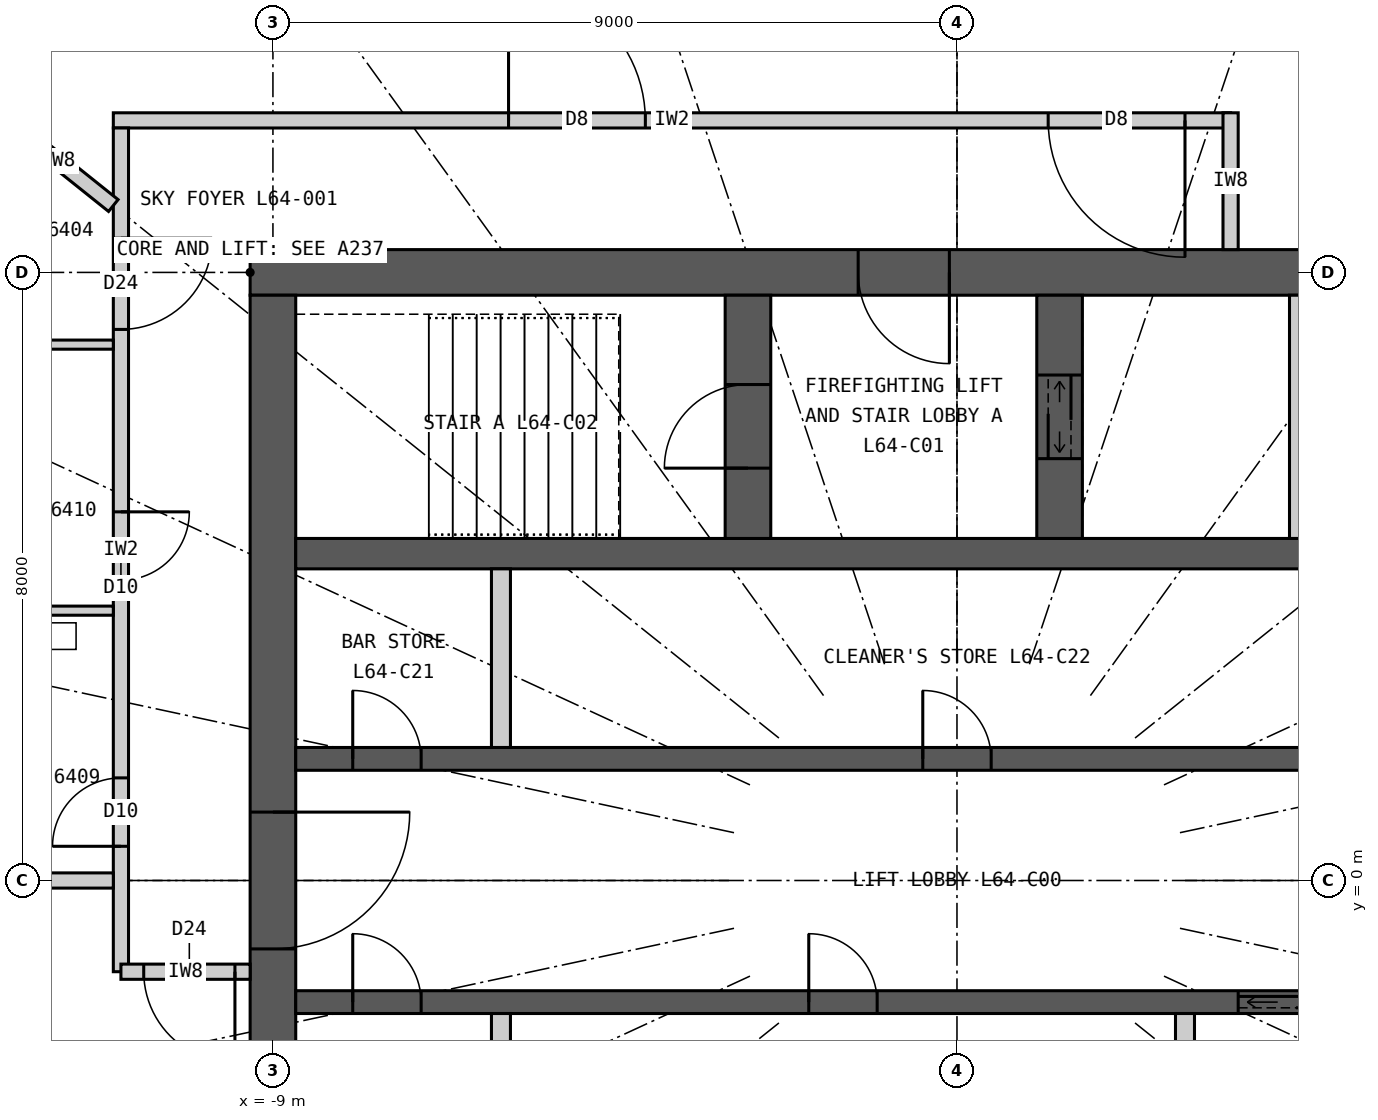
"""IFC4 building model, lengths in metres.
Left out: names, types, materials, properties, quantities, classifications, styles, units other than length and angle.
Written with IfcOpenShell. Run it as: python <this file> out.ifc"""

import sys

from ifc_helpers import new_model, si_unit, direction, frame, frame_2d, origin, place, context, subcontext, project, spatial, rectangle, extrude, element, fill, save


model = new_model("IFC4")
c1 = context("Model", 3, precision=1e-05, world=origin(), true_north=direction((0.0, 1.0)))
c2 = subcontext(c1, "Body", "Model", "MODEL_VIEW")
j1 = project(units=[si_unit("LENGTHUNIT", "METRE"), si_unit("PLANEANGLEUNIT", "RADIAN")], contexts=[c1])
p1 = place(None, origin())
s1 = spatial("IfcSite", under=j1, at=p1, CompositionType="ELEMENT")
p2 = place(p1, origin())
s2 = spatial("IfcBuilding", under=s1, at=p2, CompositionType="ELEMENT")
p3 = place(p2, frame((0.0, 0.0, 237.3)))
s3 = spatial("IfcBuildingStorey", under=s2, at=p3, CompositionType="ELEMENT", Elevation=237.3)
p4 = place(p3, frame((-9.3, 8.0, 0.0), z_axis=(0.0, 0.0, 1.0), x_axis=(1.0, 0.0, 0.0)))
e1 = element("IfcWall", 1, at=p4, inside=s3, PredefinedType="SHEAR", context=c2, shape_type="SweptSolid", body=[
    extrude(rectangle(XDim=18.6, YDim=0.6, at=frame_2d((9.3, 0.0))), origin(), (0.0, 0.0, 1.0), 5.4),
])
p5 = place(p4, frame((8.0, 0.0, 0.0)))
e2 = element("IfcOpeningElement", 2, at=p5, cuts=e1, PredefinedType="OPENING", context=c2, shape_type="SweptSolid", body=[
    extrude(rectangle(XDim=1.2, YDim=2.2, at=frame_2d((0.6, 1.1))), frame((0.0, 0.31, 0.0), z_axis=(0.0, -1.0, 0.0), x_axis=(1.0, 0.0, 0.0)), (0.0, 0.0, 1.0), 0.62),
])
p6 = place(p4, frame((15.6, 0.0, 0.0)))
e3 = element("IfcOpeningElement", 3, at=p6, cuts=e1, PredefinedType="OPENING", context=c2, shape_type="SweptSolid", body=[
    extrude(rectangle(XDim=0.9, YDim=2.2, at=frame_2d((0.45, 1.1))), frame((0.0, 0.31, 0.0), z_axis=(0.0, -1.0, 0.0), x_axis=(1.0, 0.0, 0.0)), (0.0, 0.0, 1.0), 0.62),
])
p7 = place(p3, frame((-9.0, 7.7, 0.0), z_axis=(0.0, 0.0, 1.0), x_axis=(0.0, -1.0, 0.0)))
e4 = element("IfcWall", 4, at=p7, inside=s3, PredefinedType="SHEAR", context=c2, shape_type="SweptSolid", body=[
    extrude(rectangle(XDim=15.4, YDim=0.6, at=frame_2d((7.7, 0.0))), origin(), (0.0, 0.0, 1.0), 5.4),
])
p8 = place(p7, frame((6.8, 0.0, 0.0)))
e5 = element("IfcOpeningElement", 5, at=p8, cuts=e4, PredefinedType="OPENING", context=c2, shape_type="SweptSolid", body=[
    extrude(rectangle(XDim=1.8, YDim=2.2, at=frame_2d((0.9, 1.1))), frame((0.0, 0.31, 0.0), z_axis=(0.0, -1.0, 0.0), x_axis=(1.0, 0.0, 0.0)), (0.0, 0.0, 1.0), 0.62),
])
p9 = place(p3, frame((-8.7, 4.3, 0.0), z_axis=(0.0, 0.0, 1.0), x_axis=(1.0, 0.0, 0.0)))
e6 = element("IfcWall", 6, at=p9, inside=s3, PredefinedType="SHEAR", context=c2, shape_type="SweptSolid", body=[
    extrude(rectangle(XDim=17.4, YDim=0.4, at=frame_2d((8.7, 0.0))), origin(), (0.0, 0.0, 1.0), 5.4),
])
p10 = place(p3, frame((-8.7, 1.6, 0.0), z_axis=(0.0, 0.0, 1.0), x_axis=(1.0, 0.0, 0.0)))
e7 = element("IfcWall", 7, at=p10, inside=s3, PredefinedType="SHEAR", context=c2, shape_type="SweptSolid", body=[
    extrude(rectangle(XDim=17.4, YDim=0.3, at=frame_2d((8.7, 0.0))), origin(), (0.0, 0.0, 1.0), 5.4),
])
p11 = place(p10, frame((15.5, 0.0, 0.0)))
e8 = element("IfcOpeningElement", 8, at=p11, cuts=e7, PredefinedType="OPENING", context=c2, shape_type="SweptSolid", body=[
    extrude(rectangle(XDim=1.4, YDim=2.4, at=frame_2d((0.7, 1.2))), frame((0.0, 0.16, 0.0), z_axis=(0.0, -1.0, 0.0), x_axis=(1.0, 0.0, 0.0)), (0.0, 0.0, 1.0), 0.32),
])
p12 = place(p10, frame((0.75, 0.0, 0.0)))
e9 = element("IfcOpeningElement", 9, at=p12, cuts=e7, PredefinedType="OPENING", context=c2, shape_type="SweptSolid", body=[
    extrude(rectangle(XDim=0.9, YDim=2.2, at=frame_2d((0.45, 1.1))), frame((0.0, 0.16, 0.0), z_axis=(0.0, -1.0, 0.0), x_axis=(1.0, 0.0, 0.0)), (0.0, 0.0, 1.0), 0.32),
])
p13 = place(p10, frame((8.25, 0.0, 0.0)))
e10 = element("IfcOpeningElement", 10, at=p13, cuts=e7, PredefinedType="OPENING", context=c2, shape_type="SweptSolid", body=[
    extrude(rectangle(XDim=0.9, YDim=2.2, at=frame_2d((0.45, 1.1))), frame((0.0, 0.16, 0.0), z_axis=(0.0, -1.0, 0.0), x_axis=(1.0, 0.0, 0.0)), (0.0, 0.0, 1.0), 0.32),
])
p14 = place(p3, frame((-8.7, -1.6, 0.0), z_axis=(0.0, 0.0, 1.0), x_axis=(1.0, 0.0, 0.0)))
e11 = element("IfcWall", 11, at=p14, inside=s3, PredefinedType="SHEAR", context=c2, shape_type="SweptSolid", body=[
    extrude(rectangle(XDim=17.4, YDim=0.3, at=frame_2d((8.7, 0.0))), origin(), (0.0, 0.0, 1.0), 5.4),
])
p15 = place(p14, frame((12.4, 0.0, 0.0)))
e12 = element("IfcOpeningElement", 12, at=p15, cuts=e11, PredefinedType="OPENING", context=c2, shape_type="SweptSolid", body=[
    extrude(rectangle(XDim=1.6, YDim=2.4, at=frame_2d((0.8, 1.2))), frame((0.0, 0.16, 0.0), z_axis=(0.0, -1.0, 0.0), x_axis=(1.0, 0.0, 0.0)), (0.0, 0.0, 1.0), 0.32),
])
p16 = place(p14, frame((15.5, 0.0, 0.0)))
e13 = element("IfcOpeningElement", 13, at=p16, cuts=e11, PredefinedType="OPENING", context=c2, shape_type="SweptSolid", body=[
    extrude(rectangle(XDim=1.4, YDim=2.4, at=frame_2d((0.7, 1.2))), frame((0.0, 0.16, 0.0), z_axis=(0.0, -1.0, 0.0), x_axis=(1.0, 0.0, 0.0)), (0.0, 0.0, 1.0), 0.32),
])
p17 = place(p14, frame((0.75, 0.0, 0.0)))
e14 = element("IfcOpeningElement", 14, at=p17, cuts=e11, PredefinedType="OPENING", context=c2, shape_type="SweptSolid", body=[
    extrude(rectangle(XDim=0.9, YDim=2.2, at=frame_2d((0.45, 1.1))), frame((0.0, 0.16, 0.0), z_axis=(0.0, -1.0, 0.0), x_axis=(1.0, 0.0, 0.0)), (0.0, 0.0, 1.0), 0.32),
])
p18 = place(p14, frame((6.75, 0.0, 0.0)))
e15 = element("IfcOpeningElement", 15, at=p18, cuts=e11, PredefinedType="OPENING", context=c2, shape_type="SweptSolid", body=[
    extrude(rectangle(XDim=0.9, YDim=2.2, at=frame_2d((0.45, 1.1))), frame((0.0, 0.16, 0.0), z_axis=(0.0, -1.0, 0.0), x_axis=(1.0, 0.0, 0.0)), (0.0, 0.0, 1.0), 0.32),
])
p19 = place(p3, frame((-2.75, 4.5, 0.0), z_axis=(0.0, 0.0, 1.0), x_axis=(0.0, 1.0, 0.0)))
e16 = element("IfcWall", 16, at=p19, inside=s3, PredefinedType="SHEAR", context=c2, shape_type="SweptSolid", body=[
    extrude(rectangle(XDim=3.2, YDim=0.6, at=frame_2d((1.6, 0.0))), origin(), (0.0, 0.0, 1.0), 5.4),
])
p20 = place(p19, frame((0.925, 0.0, 0.0)))
e17 = element("IfcOpeningElement", 17, at=p20, cuts=e16, PredefinedType="OPENING", context=c2, shape_type="SweptSolid", body=[
    extrude(rectangle(XDim=1.1, YDim=2.2, at=frame_2d((0.55, 1.1))), frame((0.0, 0.31, 0.0), z_axis=(0.0, -1.0, 0.0), x_axis=(1.0, 0.0, 0.0)), (0.0, 0.0, 1.0), 0.62),
])
p21 = place(p3, frame((1.35, 4.5, 0.0), z_axis=(0.0, 0.0, 1.0), x_axis=(0.0, 1.0, 0.0)))
e18 = element("IfcWall", 18, at=p21, inside=s3, PredefinedType="SHEAR", context=c2, shape_type="SweptSolid", body=[
    extrude(rectangle(XDim=3.2, YDim=0.6, at=frame_2d((1.6, 0.0))), origin(), (0.0, 0.0, 1.0), 5.4),
])
p22 = place(p21, frame((1.05, 0.0, 0.0)))
e19 = element("IfcOpeningElement", 19, at=p22, cuts=e18, PredefinedType="OPENING", context=c2, shape_type="SweptSolid", body=[
    extrude(rectangle(XDim=1.1, YDim=2.2, at=frame_2d((0.55, 1.1))), frame((0.0, 0.31, 0.0), z_axis=(0.0, -1.0, 0.0), x_axis=(1.0, 0.0, 0.0)), (0.0, 0.0, 1.0), 0.62),
])
p23 = place(p3, frame((4.5, 4.5, 0.0), z_axis=(0.0, 0.0, 1.0), x_axis=(0.0, 1.0, 0.0)))
e20 = element("IfcWall", 20, at=p23, inside=s3, PredefinedType="PARTITIONING", context=c2, shape_type="SweptSolid", body=[
    extrude(rectangle(XDim=3.2, YDim=0.25, at=frame_2d((1.6, 0.0))), origin(), (0.0, 0.0, 1.0), 5.4),
])
for number, where, z_axis, x_axis in (
    (21, (-6.0, 1.75, 0.0), (0.0, 0.0, 1.0), (0.0, 1.0, 0.0)),
    (22, (-6.0, -4.1, 0.0), (0.0, 0.0, 1.0), (0.0, 1.0, 0.0)),
    (23, (3.0, -4.1, 0.0), (0.0, 0.0, 1.0), (0.0, 1.0, 0.0)),
):
    element("IfcWall", number, at=place(p3, frame(where, z_axis=z_axis, x_axis=x_axis)), inside=s3, PredefinedType="PARTITIONING", context=c2, shape_type="SweptSolid", body=[
        extrude(rectangle(XDim=2.35, YDim=0.25, at=frame_2d((1.175, 0.0))), origin(), (0.0, 0.0, 1.0), 5.4),
    ])
p24 = place(p3, frame((-9.346, 12.951, 0.0), z_axis=(0.0, 0.0, 1.0), x_axis=(-0.858849230109, -0.512228464594, 0.0)))
e24 = element("IfcWall", 24, at=p24, inside=s3, PredefinedType="ELEMENTEDWALL", context=c2, shape_type="SweptSolid", body=[
    extrude(rectangle(XDim=4.564, YDim=0.15, at=frame_2d((2.282, 0.0))), origin(), (0.0, 0.0, 1.0), 5.15),
])
p25 = place(p24, frame((0.782, 0.0, 0.5)))
e25 = element("IfcOpeningElement", 25, at=p25, cuts=e24, PredefinedType="OPENING", context=c2, shape_type="SweptSolid", body=[
    extrude(rectangle(XDim=1.2, YDim=3.6, at=frame_2d((0.6, 1.8))), frame((0.0, 0.085, 0.0), z_axis=(0.0, -1.0, 0.0), x_axis=(1.0, 0.0, 0.0)), (0.0, 0.0, 1.0), 0.17),
])
p26 = place(p24, frame((2.582, 0.0, 0.5)))
e26 = element("IfcOpeningElement", 26, at=p26, cuts=e24, PredefinedType="OPENING", context=c2, shape_type="SweptSolid", body=[
    extrude(rectangle(XDim=1.2, YDim=3.6, at=frame_2d((0.6, 1.8))), frame((0.0, 0.085, 0.0), z_axis=(0.0, -1.0, 0.0), x_axis=(1.0, 0.0, 0.0)), (0.0, 0.0, 1.0), 0.17),
])
p27 = place(p3, frame((-11.1, 10.0, 0.0), z_axis=(0.0, 0.0, 1.0), x_axis=(1.0, 0.0, 0.0)))
e27 = element("IfcWall", 27, at=p27, inside=s3, PredefinedType="PARTITIONING", context=c2, shape_type="SweptSolid", body=[
    extrude(rectangle(XDim=14.7, YDim=0.2, at=frame_2d((7.35, 0.0))), origin(), (0.0, 0.0, 1.0), 5.15),
])
p28 = place(p27, frame((5.2, 0.0, 0.0)))
e28 = element("IfcOpeningElement", 28, at=p28, cuts=e27, PredefinedType="OPENING", context=c2, shape_type="SweptSolid", body=[
    extrude(rectangle(XDim=1.8, YDim=2.4, at=frame_2d((0.9, 1.2))), frame((0.0, 0.11, 0.0), z_axis=(0.0, -1.0, 0.0), x_axis=(1.0, 0.0, 0.0)), (0.0, 0.0, 1.0), 0.22),
])
p29 = place(p27, frame((12.3, 0.0, 0.0)))
e29 = element("IfcOpeningElement", 29, at=p29, cuts=e27, PredefinedType="OPENING", context=c2, shape_type="SweptSolid", body=[
    extrude(rectangle(XDim=1.8, YDim=2.4, at=frame_2d((0.9, 1.2))), frame((0.0, 0.11, 0.0), z_axis=(0.0, -1.0, 0.0), x_axis=(1.0, 0.0, 0.0)), (0.0, 0.0, 1.0), 0.22),
])
p30 = place(p3, frame((-11.0, 9.9, 0.0), z_axis=(0.0, 0.0, 1.0), x_axis=(0.0, -1.0, 0.0)))
e30 = element("IfcWall", 30, at=p30, inside=s3, PredefinedType="PARTITIONING", context=c2, shape_type="SweptSolid", body=[
    extrude(rectangle(XDim=11.1, YDim=0.2, at=frame_2d((5.55, 0.0))), origin(), (0.0, 0.0, 1.0), 5.15),
])
p31 = place(p30, frame((1.45, 0.0, 0.0)))
e31 = element("IfcOpeningElement", 31, at=p31, cuts=e30, PredefinedType="OPENING", context=c2, shape_type="SweptSolid", body=[
    extrude(rectangle(XDim=1.2, YDim=2.2, at=frame_2d((0.6, 1.1))), frame((0.0, 0.11, 0.0), z_axis=(0.0, -1.0, 0.0), x_axis=(1.0, 0.0, 0.0)), (0.0, 0.0, 1.0), 0.22),
])
p32 = place(p30, frame((8.55, 0.0, 0.0)))
e32 = element("IfcOpeningElement", 32, at=p32, cuts=e30, PredefinedType="OPENING", context=c2, shape_type="SweptSolid", body=[
    extrude(rectangle(XDim=0.9, YDim=2.1, at=frame_2d((0.45, 1.05))), frame((0.0, 0.11, 0.0), z_axis=(0.0, -1.0, 0.0), x_axis=(1.0, 0.0, 0.0)), (0.0, 0.0, 1.0), 0.22),
])
p33 = place(p30, frame((5.05, 0.0, 0.0)))
e33 = element("IfcOpeningElement", 33, at=p33, cuts=e30, PredefinedType="OPENING", context=c2, shape_type="SweptSolid", body=[
    extrude(rectangle(XDim=0.9, YDim=2.1, at=frame_2d((0.45, 1.05))), frame((0.0, 0.11, 0.0), z_axis=(0.0, -1.0, 0.0), x_axis=(1.0, 0.0, 0.0)), (0.0, 0.0, 1.0), 0.22),
])
p34 = place(p3, frame((-11.1, 8.88, 0.0), z_axis=(0.0, 0.0, 1.0), x_axis=(-0.780830450176, 0.62474299362, 0.0)))
e34 = element("IfcWall", 34, at=p34, inside=s3, PredefinedType="PARTITIONING", context=c2, shape_type="SweptSolid", body=[
    extrude(rectangle(XDim=1.863, YDim=0.2, at=frame_2d((0.931, 0.0))), origin(), (0.0, 0.0, 1.0), 5.15),
])
p35 = place(p3, frame((-11.1, 0.0, 0.0), z_axis=(0.0, 0.0, 1.0), x_axis=(-1.0, 0.0, 0.0)))
e35 = element("IfcWall", 35, at=p35, inside=s3, PredefinedType="PARTITIONING", context=c2, shape_type="SweptSolid", body=[
    extrude(rectangle(XDim=6.9, YDim=0.2, at=frame_2d((3.45, 0.0))), origin(), (0.0, 0.0, 1.0), 4.3),
])
p36 = place(p3, frame((3.6, 8.3, 0.0), z_axis=(0.0, 0.0, 1.0), x_axis=(0.0, 1.0, 0.0)))
e36 = element("IfcWall", 36, at=p36, inside=s3, PredefinedType="PARTITIONING", context=c2, shape_type="SweptSolid", body=[
    extrude(rectangle(XDim=1.8, YDim=0.2, at=frame_2d((0.9, 0.0))), origin(), (0.0, 0.0, 1.0), 5.15),
])
p37 = place(p3, frame((-9.3, -1.2, 0.0), z_axis=(0.0, 0.0, 1.0), x_axis=(-1.0, 0.0, 0.0)))
e37 = element("IfcWall", 37, at=p37, inside=s3, PredefinedType="PARTITIONING", context=c2, shape_type="SweptSolid", body=[
    extrude(rectangle(XDim=1.7, YDim=0.2, at=frame_2d((0.85, 0.0))), origin(), (0.0, 0.0, 1.0), 5.15),
])
p38 = place(p37, frame((0.2, 0.0, 0.0)))
e38 = element("IfcOpeningElement", 38, at=p38, cuts=e37, PredefinedType="OPENING", context=c2, shape_type="SweptSolid", body=[
    extrude(rectangle(XDim=1.2, YDim=2.2, at=frame_2d((0.6, 1.1))), frame((0.0, 0.11, 0.0), z_axis=(0.0, -1.0, 0.0), x_axis=(1.0, 0.0, 0.0)), (0.0, 0.0, 1.0), 0.22),
])
for number, where, z_axis, x_axis in (
    (39, (-11.1, 3.55, 0.0), (0.0, 0.0, 1.0), (-1.0, 0.0, 0.0)),
    (40, (-11.1, 7.05, 0.0), (0.0, 0.0, 1.0), (-1.0, 0.0, 0.0)),
):
    element("IfcWall", number, at=place(p3, frame(where, z_axis=z_axis, x_axis=x_axis)), inside=s3, PredefinedType="PARTITIONING", context=c2, shape_type="SweptSolid", body=[
        extrude(rectangle(XDim=3.54, YDim=0.12, at=frame_2d((1.77, 0.0))), origin(), (0.0, 0.0, 1.0), 5.15),
    ])
p39 = place(p28, origin())
e41 = element("IfcDoor", 41, at=p39, inside=s3, OperationType="DOUBLE_DOOR_DOUBLE_SWING", PredefinedType="DOOR", context=c2, shape_type="SweptSolid", body=[
    extrude(rectangle(XDim=1.8, YDim=2.4, at=frame_2d((0.9, 1.2))), frame((0.0, 0.025, 0.0), z_axis=(0.0, -1.0, 0.0), x_axis=(1.0, 0.0, 0.0)), (0.0, 0.0, 1.0), 0.05),
])
fill(e28, e41)
p40 = place(p38, origin())
e42 = element("IfcDoor", 42, at=p40, inside=s3, OperationType="SINGLE_SWING_LEFT", PredefinedType="DOOR", context=c2, shape_type="SweptSolid", body=[
    extrude(rectangle(XDim=1.2, YDim=2.2, at=frame_2d((0.6, 1.1))), frame((0.0, 0.025, 0.0), z_axis=(0.0, -1.0, 0.0), x_axis=(1.0, 0.0, 0.0)), (0.0, 0.0, 1.0), 0.05),
])
fill(e38, e42)
p41 = place(p31, origin())
e43 = element("IfcDoor", 43, at=p41, inside=s3, OperationType="SINGLE_SWING_LEFT", PredefinedType="DOOR", context=c2, shape_type="SweptSolid", body=[
    extrude(rectangle(XDim=1.2, YDim=2.2, at=frame_2d((0.6, 1.1))), frame((0.0, 0.025, 0.0), z_axis=(0.0, -1.0, 0.0), x_axis=(1.0, 0.0, 0.0)), (0.0, 0.0, 1.0), 0.05),
])
fill(e31, e43)
p42 = place(p32, origin())
e44 = element("IfcDoor", 44, at=p42, inside=s3, OperationType="SINGLE_SWING_RIGHT", PredefinedType="DOOR", context=c2, shape_type="SweptSolid", body=[
    extrude(rectangle(XDim=0.9, YDim=2.1, at=frame_2d((0.45, 1.05))), frame((0.0, 0.025, 0.0), z_axis=(0.0, -1.0, 0.0), x_axis=(1.0, 0.0, 0.0)), (0.0, 0.0, 1.0), 0.05),
])
fill(e32, e44)
p43 = place(p33, origin())
e45 = element("IfcDoor", 45, at=p43, inside=s3, OperationType="SINGLE_SWING_LEFT", PredefinedType="DOOR", context=c2, shape_type="SweptSolid", body=[
    extrude(rectangle(XDim=0.9, YDim=2.1, at=frame_2d((0.45, 1.05))), frame((0.0, 0.025, 0.0), z_axis=(0.0, -1.0, 0.0), x_axis=(1.0, 0.0, 0.0)), (0.0, 0.0, 1.0), 0.05),
])
fill(e33, e45)
p44 = place(p5, origin())
e46 = element("IfcDoor", 46, at=p44, inside=s3, OperationType="SINGLE_SWING_RIGHT", PredefinedType="DOOR", context=c2, shape_type="SweptSolid", body=[
    extrude(rectangle(XDim=1.2, YDim=2.2, at=frame_2d((0.6, 1.1))), frame((0.0, 0.025, 0.0), z_axis=(0.0, -1.0, 0.0), x_axis=(1.0, 0.0, 0.0)), (0.0, 0.0, 1.0), 0.05),
])
fill(e2, e46)
p45 = place(p20, origin())
e47 = element("IfcDoor", 47, at=p45, inside=s3, OperationType="SINGLE_SWING_LEFT", PredefinedType="DOOR", context=c2, shape_type="SweptSolid", body=[
    extrude(rectangle(XDim=1.1, YDim=2.2, at=frame_2d((0.55, 1.1))), frame((0.0, 0.025, 0.0), z_axis=(0.0, -1.0, 0.0), x_axis=(1.0, 0.0, 0.0)), (0.0, 0.0, 1.0), 0.05),
])
fill(e17, e47)
p46 = place(p22, origin())
e48 = element("IfcDoor", 48, at=p46, inside=s3, OperationType="DOUBLE_DOOR_SLIDING", PredefinedType="DOOR", context=c2, shape_type="SweptSolid", body=[
    extrude(rectangle(XDim=1.1, YDim=2.2, at=frame_2d((0.55, 1.1))), frame((0.0, 0.025, 0.0), z_axis=(0.0, -1.0, 0.0), x_axis=(1.0, 0.0, 0.0)), (0.0, 0.0, 1.0), 0.05),
])
fill(e19, e48)
p47 = place(p15, origin())
e49 = element("IfcDoor", 49, at=p47, inside=s3, OperationType="DOUBLE_DOOR_SLIDING", PredefinedType="DOOR", context=c2, shape_type="SweptSolid", body=[
    extrude(rectangle(XDim=1.6, YDim=2.4, at=frame_2d((0.8, 1.2))), frame((0.0, 0.025, 0.0), z_axis=(0.0, -1.0, 0.0), x_axis=(1.0, 0.0, 0.0)), (0.0, 0.0, 1.0), 0.05),
])
fill(e12, e49)
p48 = place(p12, origin())
e50 = element("IfcDoor", 50, at=p48, inside=s3, OperationType="SINGLE_SWING_LEFT", PredefinedType="DOOR", context=c2, shape_type="SweptSolid", body=[
    extrude(rectangle(XDim=0.9, YDim=2.2, at=frame_2d((0.45, 1.1))), frame((0.0, 0.025, 0.0), z_axis=(0.0, -1.0, 0.0), x_axis=(1.0, 0.0, 0.0)), (0.0, 0.0, 1.0), 0.05),
])
fill(e9, e50)
p49 = place(p13, origin())
e51 = element("IfcDoor", 51, at=p49, inside=s3, OperationType="SINGLE_SWING_LEFT", PredefinedType="DOOR", context=c2, shape_type="SweptSolid", body=[
    extrude(rectangle(XDim=0.9, YDim=2.2, at=frame_2d((0.45, 1.1))), frame((0.0, 0.025, 0.0), z_axis=(0.0, -1.0, 0.0), x_axis=(1.0, 0.0, 0.0)), (0.0, 0.0, 1.0), 0.05),
])
fill(e10, e51)
p50 = place(p17, origin())
e52 = element("IfcDoor", 52, at=p50, inside=s3, OperationType="SINGLE_SWING_LEFT", PredefinedType="DOOR", context=c2, shape_type="SweptSolid", body=[
    extrude(rectangle(XDim=0.9, YDim=2.2, at=frame_2d((0.45, 1.1))), frame((0.0, 0.025, 0.0), z_axis=(0.0, -1.0, 0.0), x_axis=(1.0, 0.0, 0.0)), (0.0, 0.0, 1.0), 0.05),
])
fill(e14, e52)
p51 = place(p18, origin())
e53 = element("IfcDoor", 53, at=p51, inside=s3, OperationType="SINGLE_SWING_LEFT", PredefinedType="DOOR", context=c2, shape_type="SweptSolid", body=[
    extrude(rectangle(XDim=0.9, YDim=2.2, at=frame_2d((0.45, 1.1))), frame((0.0, 0.025, 0.0), z_axis=(0.0, -1.0, 0.0), x_axis=(1.0, 0.0, 0.0)), (0.0, 0.0, 1.0), 0.05),
])
fill(e15, e53)
p52 = place(p8, origin())
e54 = element("IfcDoor", 54, at=p52, inside=s3, OperationType="DOUBLE_DOOR_DOUBLE_SWING", PredefinedType="DOOR", context=c2, shape_type="SweptSolid", body=[
    extrude(rectangle(XDim=1.8, YDim=2.2, at=frame_2d((0.9, 1.1))), frame((0.0, 0.025, 0.0), z_axis=(0.0, -1.0, 0.0), x_axis=(1.0, 0.0, 0.0)), (0.0, 0.0, 1.0), 0.05),
])
fill(e5, e54)
p53 = place(p29, origin())
e55 = element("IfcDoor", 55, at=p53, inside=s3, OperationType="DOUBLE_DOOR_DOUBLE_SWING", PredefinedType="DOOR", context=c2, shape_type="SweptSolid", body=[
    extrude(rectangle(XDim=1.8, YDim=2.4, at=frame_2d((0.9, 1.2))), frame((0.0, 0.025, 0.0), z_axis=(0.0, -1.0, 0.0), x_axis=(1.0, 0.0, 0.0)), (0.0, 0.0, 1.0), 0.05),
])
fill(e29, e55)
save(model, sys.argv[1])
